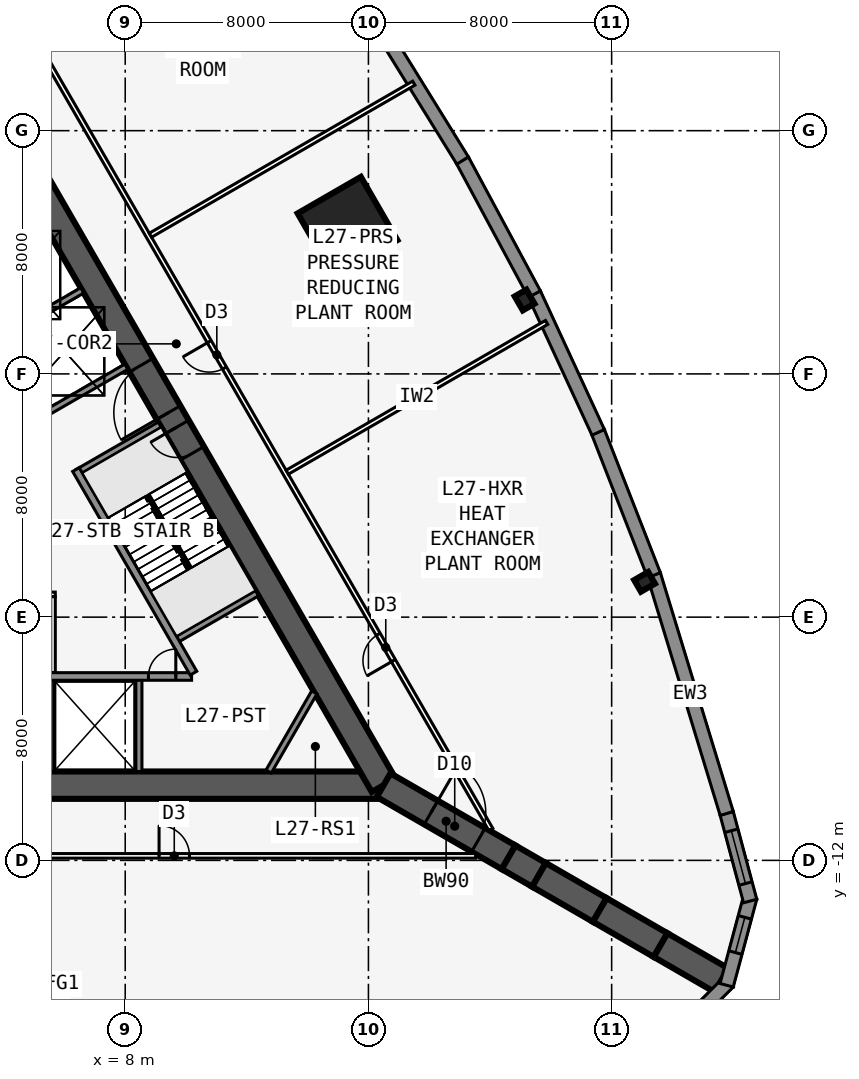
"""IFC4 building model, lengths in metres.
Left out: names, types, materials, properties, quantities, classifications, styles, units other than length and angle.
Written with IfcOpenShell. Run it as: python <this file> out.ifc"""

import sys

from ifc_helpers import new_model, si_unit, direction, frame, frame_2d, origin, origin_2d, place, context, subcontext, project, spatial, polyline, rectangle, i_section, outline, extrude, element, fill, save


model = new_model("IFC4")
c1 = context("Model", 3, precision=1e-05, world=origin(), true_north=direction((0.0, 1.0)))
c2 = subcontext(c1, "Body", "Model", "MODEL_VIEW")
j1 = project(units=[si_unit("LENGTHUNIT", "METRE"), si_unit("PLANEANGLEUNIT", "RADIAN")], contexts=[c1])
p1 = place(None, origin())
s1 = spatial("IfcSite", under=j1, at=p1, CompositionType="ELEMENT")
p2 = place(p1, origin())
s2 = spatial("IfcBuilding", under=s1, at=p2, CompositionType="ELEMENT")
p3 = place(p2, frame((0.0, 0.0, 103.3)))
s3 = spatial("IfcBuildingStorey", under=s2, at=p3, CompositionType="ELEMENT", Elevation=103.3)
p4 = place(p3, frame((-16.5, -9.526, 0.0), z_axis=(0.0, 0.0, 1.0), x_axis=(1.0, 0.0, 0.0)))
e1 = element("IfcWall", 1, at=p4, inside=s3, PredefinedType="SHEAR", context=c2, shape_type="SweptSolid", body=[
    extrude(rectangle(XDim=33.0, YDim=0.9, at=frame_2d((16.5, 0.0))), origin(), (0.0, 0.0, 1.0), 6.4),
])
p5 = place(p4, frame((14.05, 0.0, 0.0)))
e2 = element("IfcOpeningElement", 2, at=p5, cuts=e1, PredefinedType="OPENING", context=c2, shape_type="SweptSolid", body=[
    extrude(rectangle(XDim=1.8, YDim=2.13, at=frame_2d((0.9, 1.065))), frame((0.0, 0.46, 0.0), z_axis=(0.0, -1.0, 0.0), x_axis=(1.0, 0.0, 0.0)), (0.0, 0.0, 1.0), 0.92),
])
p6 = place(p3, frame((-0.55, -5.951, 0.0), z_axis=(0.0, 0.0, 1.0), x_axis=(1.0, 0.0, 0.0)))
e3 = element("IfcWall", 3, at=p6, inside=s3, PredefinedType="SOLIDWALL", context=c2, shape_type="SweptSolid", body=[
    extrude(rectangle(XDim=10.733, YDim=0.25, at=frame_2d((5.366, 0.0))), origin(), (0.0, 0.0, 1.0), 6.15),
])
p7 = place(p6, frame((9.314, 0.0, 0.0)))
e4 = element("IfcOpeningElement", 4, at=p7, cuts=e3, PredefinedType="OPENING", context=c2, shape_type="SweptSolid", body=[
    extrude(rectangle(XDim=0.9, YDim=2.13, at=frame_2d((0.45, 1.065))), frame((0.0, 0.135, 0.0), z_axis=(0.0, -1.0, 0.0), x_axis=(1.0, 0.0, 0.0)), (0.0, 0.0, 1.0), 0.27),
])
p8 = place(p6, frame((1.05, 0.0, 0.0)))
e5 = element("IfcOpeningElement", 5, at=p8, cuts=e3, PredefinedType="OPENING", context=c2, shape_type="SweptSolid", body=[
    extrude(rectangle(XDim=1.1, YDim=2.13, at=frame_2d((0.55, 1.065))), frame((0.0, 0.135, 0.0), z_axis=(0.0, -1.0, 0.0), x_axis=(1.0, 0.0, 0.0)), (0.0, 0.0, 1.0), 0.27),
])
p9 = place(p6, frame((4.05, 0.0, 0.0)))
e6 = element("IfcOpeningElement", 6, at=p9, cuts=e3, PredefinedType="OPENING", context=c2, shape_type="SweptSolid", body=[
    extrude(rectangle(XDim=1.1, YDim=2.13, at=frame_2d((0.55, 1.065))), frame((0.0, 0.135, 0.0), z_axis=(0.0, -1.0, 0.0), x_axis=(1.0, 0.0, 0.0)), (0.0, 0.0, 1.0), 0.27),
])
for number, where, z_axis, x_axis in (
    (7, (5.55, -5.951, 0.0), (0.0, 0.0, 1.0), (0.0, -1.0, 0.0)),
    (8, (8.45, -5.951, 0.0), (0.0, 0.0, 1.0), (0.0, -1.0, 0.0)),
):
    element("IfcWall", number, at=place(p3, frame(where, z_axis=z_axis, x_axis=x_axis)), inside=s3, PredefinedType="SOLIDWALL", context=c2, shape_type="SweptSolid", body=[
        extrude(rectangle(XDim=3.125, YDim=0.2, at=frame_2d((1.562, 0.0))), origin(), (0.0, 0.0, 1.0), 6.15),
    ])
p10 = place(p3, frame((16.5, -9.526, 0.0), z_axis=(0.0, 0.0, 1.0), x_axis=(-0.499999749417, 0.866025548458, 0.0)))
e9 = element("IfcWall", 9, at=p10, inside=s3, PredefinedType="SHEAR", context=c2, shape_type="SweptSolid", body=[
    extrude(rectangle(XDim=33.0, YDim=0.9, at=frame_2d((16.5, 0.0))), origin(), (0.0, 0.0, 1.0), 6.4),
])
p11 = place(p10, frame((14.15, 0.0, 0.0)))
e10 = element("IfcOpeningElement", 10, at=p11, cuts=e9, PredefinedType="OPENING", context=c2, shape_type="SweptSolid", body=[
    extrude(rectangle(XDim=1.8, YDim=2.13, at=frame_2d((0.9, 1.065))), frame((0.0, 0.46, 0.0), z_axis=(0.0, -1.0, 0.0), x_axis=(1.0, 0.0, 0.0)), (0.0, 0.0, 1.0), 0.92),
])
p12 = place(p10, frame((12.6, 0.0, 0.0)))
e11 = element("IfcOpeningElement", 11, at=p12, cuts=e9, PredefinedType="OPENING", context=c2, shape_type="SweptSolid", body=[
    extrude(rectangle(XDim=1.0, YDim=2.13, at=frame_2d((0.5, 1.065))), frame((0.0, 0.46, 0.0), z_axis=(0.0, -1.0, 0.0), x_axis=(1.0, 0.0, 0.0)), (0.0, 0.0, 1.0), 0.92),
])
p13 = place(p3, frame((10.245, -5.843, 0.0), z_axis=(0.0, 0.0, 1.0), x_axis=(-0.499993009313, 0.866029439822, 0.0)))
e12 = element("IfcWall", 12, at=p13, inside=s3, PredefinedType="SOLIDWALL", context=c2, shape_type="SweptSolid", body=[
    extrude(rectangle(XDim=7.733, YDim=0.25, at=frame_2d((3.866, 0.0))), origin(), (0.0, 0.0, 1.0), 6.15),
])
for number, where, z_axis, x_axis in (
    (13, (9.629, -4.775, 0.0), (0.0, 0.0, 1.0), (0.866, 0.5, 0.0)),
    (14, (6.429, 0.767, 0.0), (0.0, 0.0, 1.0), (0.866, 0.5, 0.0)),
    (15, (5.329, 2.673, 0.0), (0.0, 0.0, 1.0), (0.866, 0.5, 0.0)),
    (16, (3.879, 5.184, 0.0), (0.0, 0.0, 1.0), (0.866, 0.5, 0.0)),
):
    element("IfcWall", number, at=place(p3, frame(where, z_axis=z_axis, x_axis=x_axis)), inside=s3, PredefinedType="SOLIDWALL", context=c2, shape_type="SweptSolid", body=[
        extrude(rectangle(XDim=3.125, YDim=0.2, at=frame_2d((1.562, 0.0))), origin(), (0.0, 0.0, 1.0), 6.15),
    ])
p14 = place(p3, frame((16.5, -9.526, 0.0), z_axis=(0.0, 0.0, 1.0), x_axis=(0.866031398331, -0.499989616998, 0.0)))
e17 = element("IfcWall", 17, at=p14, inside=s3, PredefinedType="SHEAR", context=c2, shape_type="SweptSolid", body=[
    extrude(rectangle(XDim=4.746, YDim=0.9, at=frame_2d((2.373, 0.0))), origin(), (0.0, 0.0, 1.0), 6.4),
])
p15 = place(p14, frame((1.8, 0.0, 0.0)))
e18 = element("IfcOpeningElement", 18, at=p15, cuts=e17, PredefinedType="OPENING", context=c2, shape_type="SweptSolid", body=[
    extrude(rectangle(XDim=1.8, YDim=2.13, at=frame_2d((0.9, 1.065))), frame((0.0, 0.46, 0.0), z_axis=(0.0, -1.0, 0.0), x_axis=(1.0, 0.0, 0.0)), (0.0, 0.0, 1.0), 0.92),
])
p16 = place(p3, frame((20.61, -11.899, 0.0), z_axis=(0.0, 0.0, 1.0), x_axis=(0.866009537788, -0.500027479704, 0.0)))
e19 = element("IfcWall", 19, at=p16, inside=s3, PredefinedType="SHEAR", context=c2, shape_type="SweptSolid", body=[
    extrude(rectangle(XDim=1.155, YDim=0.9, at=frame_2d((0.577, 0.0))), origin(), (0.0, 0.0, 1.0), 6.4),
])
for number, where, z_axis, x_axis in (
    (20, (21.61, -12.477, 0.0), (0.0, 0.0, 1.0), (0.866, -0.5, 0.0)),
    (21, (23.61, -13.631, 0.0), (0.0, 0.0, 1.0), (0.866, -0.5, 0.0)),
    (22, (25.61, -14.786, 0.0), (0.0, 0.0, 1.0), (0.866, -0.5, 0.0)),
):
    element("IfcWall", number, at=place(p3, frame(where, z_axis=z_axis, x_axis=x_axis)), inside=s3, PredefinedType="SHEAR", context=c2, shape_type="SweptSolid", body=[
        extrude(rectangle(XDim=2.309, YDim=0.9, at=frame_2d((1.155, 0.0))), origin(), (0.0, 0.0, 1.0), 6.4),
    ])
for number, where, z_axis, x_axis in (
    (23, (25.083, -2.839, 0.0), (0.0, 0.0, 1.0), (-0.5, 0.866, 0.0)),
    (24, (21.137, 6.43, 0.0), (0.0, 0.0, 1.0), (0.866, 0.5, 0.0)),
):
    element("IfcColumn", number, at=place(p3, frame(where, z_axis=z_axis, x_axis=x_axis)), inside=s3, PredefinedType="COLUMN", context=c2, shape_type="SweptSolid", body=[
        extrude(i_section(OverallWidth=0.442, OverallDepth=0.531, WebThickness=0.066, FlangeThickness=0.106, at=origin_2d()), origin(), (0.0, 0.0, 1.0), 6.4),
    ])
p17 = place(p3, frame((15.312, 8.84, 0.0), z_axis=(0.0, 0.0, 1.0), x_axis=(0.866025403784, 0.5, 0.0)))
e25 = element("IfcColumn", 25, at=p17, inside=s3, PredefinedType="COLUMN", context=c2, shape_type="SweptSolid", body=[
    extrude(rectangle(XDim=2.4, YDim=2.4, at=origin_2d()), origin(), (0.0, 0.0, 1.0), 6.4),
])
p18 = place(p3, frame((25.728, -18.12, 0.0), z_axis=(0.0, 0.0, 1.0), x_axis=(0.707025086683, 0.707188466253, 0.0)))
e26 = element("IfcWall", 26, at=p18, inside=s3, PredefinedType="SOLIDWALL", context=c2, shape_type="SweptSolid", body=[
    extrude(outline(polyline([(2.989, 0.225), (2.93, 0.225), (2.438, 0.093), (2.402, 0.225), (0.0, 0.225), (0.0, -0.225), (2.989, -0.225), (2.989, 0.225)])), origin(), (0.0, 0.0, 1.0), 6.15),
])
p19 = place(p18, frame((0.676, 0.0, 1.2)))
e27 = element("IfcOpeningElement", 27, at=p19, cuts=e26, PredefinedType="OPENING", context=c2, shape_type="SweptSolid", body=[
    extrude(rectangle(XDim=1.2, YDim=3.6, at=frame_2d((0.6, 1.8))), frame((0.0, 0.235, 0.0), z_axis=(0.0, -1.0, 0.0), x_axis=(1.0, 0.0, 0.0)), (0.0, 0.0, 1.0), 0.47),
])
p20 = place(p3, frame((27.783, -16.108, 0.0), z_axis=(0.0, 0.0, 1.0), x_axis=(0.258801419081, 0.965930548995, 0.0)))
e28 = element("IfcWall", 28, at=p20, inside=s3, PredefinedType="SOLIDWALL", context=c2, shape_type="SweptSolid", body=[
    extrude(outline(polyline([(2.989, 0.225), (0.586, 0.225), (0.551, 0.093), (0.06, 0.225), (0.0, 0.225), (0.0, -0.225), (2.989, -0.225), (2.989, 0.225)])), origin(), (0.0, 0.0, 1.0), 6.15),
])
p21 = place(p20, frame((1.113, 0.0, 1.2)))
e29 = element("IfcOpeningElement", 29, at=p21, cuts=e28, PredefinedType="OPENING", context=c2, shape_type="SweptSolid", body=[
    extrude(rectangle(XDim=1.2, YDim=3.6, at=frame_2d((0.6, 1.8))), frame((0.0, 0.235, 0.0), z_axis=(0.0, -1.0, 0.0), x_axis=(1.0, 0.0, 0.0)), (0.0, 0.0, 1.0), 0.47),
])
p22 = place(p3, frame((28.556, -13.337, 0.0), z_axis=(0.0, 0.0, 1.0), x_axis=(-0.258780998834, 0.965936019953, 0.0)))
e30 = element("IfcWall", 30, at=p22, inside=s3, PredefinedType="SOLIDWALL", context=c2, shape_type="SweptSolid", body=[
    extrude(rectangle(XDim=2.989, YDim=0.45, at=frame_2d((1.494, 0.0))), origin(), (0.0, 0.0, 1.0), 6.15),
])
p23 = place(p22, frame((0.594, 0.0, 1.2)))
e31 = element("IfcOpeningElement", 31, at=p23, cuts=e30, PredefinedType="OPENING", context=c2, shape_type="SweptSolid", body=[
    extrude(rectangle(XDim=1.8, YDim=3.6, at=frame_2d((0.9, 1.8))), frame((0.0, 0.235, 0.0), z_axis=(0.0, -1.0, 0.0), x_axis=(1.0, 0.0, 0.0)), (0.0, 0.0, 1.0), 0.47),
])
p24 = place(p3, frame((27.785, -10.458, 0.0), z_axis=(0.0, 0.0, 1.0), x_axis=(-0.291997961298, 0.956418940945, 0.0)))
e32 = element("IfcWall", 32, at=p24, inside=s3, PredefinedType="SOLIDWALL", context=c2, shape_type="SweptSolid", body=[
    extrude(outline(polyline([(0.0, 0.0), (8.211, 0.0), (8.211, 6.15), (0.0, 6.15), (0.0, 0.0)]), holes=[polyline([(6.556, 3.075), (6.472, 3.709), (6.227, 4.3), (5.838, 4.807), (5.331, 5.197), (4.74, 5.441), (4.106, 5.525), (3.471, 5.441), (2.881, 5.197), (2.373, 4.807), (1.984, 4.3), (1.739, 3.709), (1.656, 3.075), (1.739, 2.441), (1.984, 1.85), (2.373, 1.343), (2.881, 0.953), (3.471, 0.708), (4.106, 0.625), (4.74, 0.708), (5.331, 0.953), (5.838, 1.343), (6.227, 1.85), (6.472, 2.441), (6.556, 3.075)])]), frame((0.0, 0.225, 0.0), z_axis=(0.0, -1.0, 0.0), x_axis=(1.0, 0.0, 0.0)), (0.0, 0.0, 1.0), 0.45),
])
p25 = place(p3, frame((25.393, -2.621, 0.0), z_axis=(0.0, 0.0, 1.0), x_axis=(-0.363971587738, 0.931410051116, 0.0)))
e33 = element("IfcWall", 33, at=p25, inside=s3, PredefinedType="SOLIDWALL", context=c2, shape_type="SweptSolid", body=[
    extrude(outline(polyline([(0.0, 0.0), (5.058, 0.0), (5.058, 6.15), (0.0, 6.15), (0.0, 0.0)]), holes=[polyline([(4.429, 3.075), (4.364, 3.567), (4.174, 4.025), (3.872, 4.418), (3.479, 4.72), (3.021, 4.91), (2.529, 4.975), (2.037, 4.91), (1.579, 4.72), (1.185, 4.418), (0.883, 4.025), (0.694, 3.567), (0.629, 3.075), (0.694, 2.583), (0.883, 2.125), (1.185, 1.731), (1.579, 1.429), (2.037, 1.24), (2.529, 1.175), (3.021, 1.24), (3.479, 1.429), (3.872, 1.731), (4.174, 2.125), (4.364, 2.583), (4.429, 3.075)])]), frame((0.0, 0.225, 0.0), z_axis=(0.0, -1.0, 0.0), x_axis=(1.0, 0.0, 0.0)), (0.0, 0.0, 1.0), 0.45),
])
p26 = place(p3, frame((23.557, 2.077, 0.0), z_axis=(0.0, 0.0, 1.0), x_axis=(-0.419203100754, 0.907892482796, 0.0)))
e34 = element("IfcWall", 34, at=p26, inside=s3, PredefinedType="SOLIDWALL", context=c2, shape_type="SweptSolid", body=[
    extrude(outline(polyline([(0.0, 0.0), (5.021, 0.0), (5.021, 6.15), (0.0, 6.15), (0.0, 0.0)]), holes=[polyline([(4.41, 3.075), (4.346, 3.567), (4.156, 4.025), (3.854, 4.418), (3.46, 4.72), (3.002, 4.91), (2.51, 4.975), (2.019, 4.91), (1.56, 4.72), (1.167, 4.418), (0.865, 4.025), (0.675, 3.567), (0.61, 3.075), (0.675, 2.583), (0.865, 2.125), (1.167, 1.731), (1.56, 1.429), (2.019, 1.24), (2.51, 1.175), (3.002, 1.24), (3.46, 1.429), (3.854, 1.731), (4.156, 2.125), (4.346, 2.583), (4.41, 3.075)])]), frame((0.0, 0.225, 0.0), z_axis=(0.0, -1.0, 0.0), x_axis=(1.0, 0.0, 0.0)), (0.0, 0.0, 1.0), 0.45),
])
p27 = place(p3, frame((21.458, 6.624, 0.0), z_axis=(0.0, 0.0, 1.0), x_axis=(-0.473412820489, 0.880840678782, 0.0)))
e35 = element("IfcWall", 35, at=p27, inside=s3, PredefinedType="SOLIDWALL", context=c2, shape_type="SweptSolid", body=[
    extrude(outline(polyline([(0.0, 0.0), (5.002, 0.0), (5.002, 6.15), (0.0, 6.15), (0.0, 0.0)]), holes=[polyline([(4.401, 3.075), (4.336, 3.567), (4.146, 4.025), (3.845, 4.418), (3.451, 4.72), (2.993, 4.91), (2.501, 4.975), (2.01, 4.91), (1.551, 4.72), (1.158, 4.418), (0.856, 4.025), (0.666, 3.567), (0.601, 3.075), (0.666, 2.583), (0.856, 2.125), (1.158, 1.731), (1.551, 1.429), (2.01, 1.24), (2.501, 1.175), (2.993, 1.24), (3.451, 1.429), (3.845, 1.731), (4.146, 2.125), (4.336, 2.583), (4.401, 3.075)])]), frame((0.0, 0.225, 0.0), z_axis=(0.0, -1.0, 0.0), x_axis=(1.0, 0.0, 0.0)), (0.0, 0.0, 1.0), 0.45),
])
p28 = place(p3, frame((19.097, 11.018, 0.0), z_axis=(0.0, 0.0, 1.0), x_axis=(-0.52611097126, 0.850415925251, 0.0)))
e36 = element("IfcWall", 36, at=p28, inside=s3, PredefinedType="SOLIDWALL", context=c2, shape_type="SweptSolid", body=[
    extrude(outline(polyline([(0.0, 0.0), (5.002, 0.0), (5.002, 6.15), (0.0, 6.15), (0.0, 0.0)]), holes=[polyline([(4.401, 3.075), (4.336, 3.567), (4.146, 4.025), (3.844, 4.418), (3.451, 4.72), (2.993, 4.91), (2.501, 4.975), (2.01, 4.91), (1.551, 4.72), (1.158, 4.418), (0.856, 4.025), (0.666, 3.567), (0.601, 3.075), (0.666, 2.583), (0.856, 2.125), (1.158, 1.731), (1.551, 1.429), (2.01, 1.24), (2.501, 1.175), (2.993, 1.24), (3.451, 1.429), (3.844, 1.731), (4.146, 2.125), (4.336, 2.583), (4.401, 3.075)])]), frame((0.0, 0.225, 0.0), z_axis=(0.0, -1.0, 0.0), x_axis=(1.0, 0.0, 0.0)), (0.0, 0.0, 1.0), 0.45),
])
p29 = place(p3, frame((-19.527, -11.851, 0.0), z_axis=(0.0, 0.0, 1.0), x_axis=(1.0, 0.0, 0.0)))
e37 = element("IfcWall", 37, at=p29, inside=s3, PredefinedType="PARTITIONING", context=c2, shape_type="SweptSolid", body=[
    extrude(rectangle(XDim=39.054, YDim=0.15, at=frame_2d((19.527, 0.0))), origin(), (0.0, 0.0, 1.0), 6.15),
])
p30 = place(p29, frame((7.414, 0.0, 0.0)))
e38 = element("IfcOpeningElement", 38, at=p30, cuts=e37, PredefinedType="OPENING", context=c2, shape_type="SweptSolid", body=[
    extrude(rectangle(XDim=1.0, YDim=2.13, at=frame_2d((0.5, 1.065))), frame((0.0, 0.085, 0.0), z_axis=(0.0, -1.0, 0.0), x_axis=(1.0, 0.0, 0.0)), (0.0, 0.0, 1.0), 0.17),
])
p31 = place(p29, frame((17.027, 0.0, 0.0)))
e39 = element("IfcOpeningElement", 39, at=p31, cuts=e37, PredefinedType="OPENING", context=c2, shape_type="SweptSolid", body=[
    extrude(rectangle(XDim=1.0, YDim=2.13, at=frame_2d((0.5, 1.065))), frame((0.0, 0.085, 0.0), z_axis=(0.0, -1.0, 0.0), x_axis=(1.0, 0.0, 0.0)), (0.0, 0.0, 1.0), 0.17),
])
p32 = place(p29, frame((28.64, 0.0, 0.0)))
e40 = element("IfcOpeningElement", 40, at=p32, cuts=e37, PredefinedType="OPENING", context=c2, shape_type="SweptSolid", body=[
    extrude(rectangle(XDim=1.0, YDim=2.13, at=frame_2d((0.5, 1.065))), frame((0.0, 0.085, 0.0), z_axis=(0.0, -1.0, 0.0), x_axis=(1.0, 0.0, 0.0)), (0.0, 0.0, 1.0), 0.17),
])
p33 = place(p3, frame((20.027, -10.985, 0.0), z_axis=(0.0, 0.0, 1.0), x_axis=(-0.500001677587, 0.866024435227, 0.0)))
e41 = element("IfcWall", 41, at=p33, inside=s3, PredefinedType="PARTITIONING", context=c2, shape_type="SweptSolid", body=[
    extrude(rectangle(XDim=39.054, YDim=0.15, at=frame_2d((19.527, 0.0))), origin(), (0.0, 0.0, 1.0), 6.15),
])
p34 = place(p33, frame((6.414, 0.0, 0.0)))
e42 = element("IfcOpeningElement", 42, at=p34, cuts=e41, PredefinedType="OPENING", context=c2, shape_type="SweptSolid", body=[
    extrude(rectangle(XDim=1.0, YDim=2.13, at=frame_2d((0.5, 1.065))), frame((0.0, 0.085, 0.0), z_axis=(0.0, -1.0, 0.0), x_axis=(1.0, 0.0, 0.0)), (0.0, 0.0, 1.0), 0.17),
])
p35 = place(p33, frame((17.527, 0.0, 0.0)))
e43 = element("IfcOpeningElement", 43, at=p35, cuts=e41, PredefinedType="OPENING", context=c2, shape_type="SweptSolid", body=[
    extrude(rectangle(XDim=1.0, YDim=2.13, at=frame_2d((0.5, 1.065))), frame((0.0, 0.085, 0.0), z_axis=(0.0, -1.0, 0.0), x_axis=(1.0, 0.0, 0.0)), (0.0, 0.0, 1.0), 0.17),
])
p36 = place(p33, frame((30.14, 0.0, 0.0)))
e44 = element("IfcOpeningElement", 44, at=p36, cuts=e41, PredefinedType="OPENING", context=c2, shape_type="SweptSolid", body=[
    extrude(rectangle(XDim=1.0, YDim=2.13, at=frame_2d((0.5, 1.065))), frame((0.0, 0.085, 0.0), z_axis=(0.0, -1.0, 0.0), x_axis=(1.0, 0.0, 0.0)), (0.0, 0.0, 1.0), 0.17),
])
p37 = place(p3, frame((13.329, 0.767, 0.0), z_axis=(0.0, 0.0, 1.0), x_axis=(0.866026289155, 0.499998466491, 0.0)))
e45 = element("IfcWall", 45, at=p37, inside=s3, PredefinedType="PARTITIONING", context=c2, shape_type="SweptSolid", body=[
    extrude(rectangle(XDim=9.852, YDim=0.15, at=frame_2d((4.926, 0.0))), origin(), (0.0, 0.0, 1.0), 6.15),
])
p38 = place(p3, frame((8.829, 8.561, 0.0), z_axis=(0.0, 0.0, 1.0), x_axis=(0.86602100491, 0.500007618997, 0.0)))
e46 = element("IfcWall", 46, at=p38, inside=s3, PredefinedType="PARTITIONING", context=c2, shape_type="SweptSolid", body=[
    extrude(rectangle(XDim=10.005, YDim=0.15, at=frame_2d((5.002, 0.0))), origin(), (0.0, 0.0, 1.0), 6.15),
])
p39 = place(p3, frame((-2.65, -3.251, 0.0), z_axis=(0.0, 0.0, 1.0), x_axis=(1.0, 0.0, 0.0)))
e47 = element("IfcWall", 47, at=p39, inside=s3, PredefinedType="PARTITIONING", context=c2, shape_type="SweptSolid", body=[
    extrude(rectangle(XDim=8.35, YDim=0.15, at=frame_2d((4.175, 0.0))), origin(), (0.0, 0.0, 1.0), 6.15),
])
p40 = place(p3, frame((5.625, -5.826, 0.0), z_axis=(0.0, 0.0, 1.0), x_axis=(0.0, 1.0, 0.0)))
e48 = element("IfcWall", 48, at=p40, inside=s3, PredefinedType="PARTITIONING", context=c2, shape_type="SweptSolid", body=[
    extrude(rectangle(XDim=2.5, YDim=0.15, at=frame_2d((1.25, 0.0))), origin(), (0.0, 0.0, 1.0), 6.15),
])
p41 = place(p3, frame((14.219, -6.476, 0.0), z_axis=(0.0, 0.0, 1.0), x_axis=(-0.499952404951, -0.866052881055, 0.0)))
e49 = element("IfcWall", 49, at=p41, inside=s3, PredefinedType="SOLIDWALL", context=c2, shape_type="SweptSolid", body=[
    extrude(rectangle(XDim=3.002, YDim=0.2, at=frame_2d((1.501, 0.0))), origin(), (0.0, 0.0, 1.0), 6.15),
])
p42 = place(p3, frame((10.135, -2.401, 0.0), z_axis=(0.0, 0.0, 1.0), x_axis=(-0.499992232847, 0.866029888106, 0.0)))
e50 = element("IfcWall", 50, at=p42, inside=s3, PredefinedType="SOLIDWALL", context=c2, shape_type="SweptSolid", body=[
    extrude(rectangle(XDim=2.794, YDim=0.1, at=frame_2d((1.397, 0.0))), origin(), (0.0, 0.0, 1.0), 6.4),
])
p43 = place(p21, origin())
e51 = element("IfcWindow", 51, at=p43, inside=s3, PartitioningType="SINGLE_PANEL", PredefinedType="WINDOW", context=c2, shape_type="SweptSolid", body=[
    extrude(rectangle(XDim=1.2, YDim=3.6, at=frame_2d((0.6, 1.8))), frame((0.0, 0.03, 0.0), z_axis=(0.0, -1.0, 0.0), x_axis=(1.0, 0.0, 0.0)), (0.0, 0.0, 1.0), 0.06),
])
fill(e29, e51)
p44 = place(p23, origin())
e52 = element("IfcWindow", 52, at=p44, inside=s3, PartitioningType="SINGLE_PANEL", PredefinedType="WINDOW", context=c2, shape_type="SweptSolid", body=[
    extrude(rectangle(XDim=1.8, YDim=3.6, at=frame_2d((0.9, 1.8))), frame((0.0, 0.03, 0.0), z_axis=(0.0, -1.0, 0.0), x_axis=(1.0, 0.0, 0.0)), (0.0, 0.0, 1.0), 0.06),
])
fill(e31, e52)
p45 = place(p32, origin())
e53 = element("IfcDoor", 53, at=p45, inside=s3, OperationType="SINGLE_SWING_LEFT", PredefinedType="DOOR", context=c2, shape_type="SweptSolid", body=[
    extrude(rectangle(XDim=1.0, YDim=2.13, at=frame_2d((0.5, 1.065))), frame((0.0, 0.025, 0.0), z_axis=(0.0, -1.0, 0.0), x_axis=(1.0, 0.0, 0.0)), (0.0, 0.0, 1.0), 0.05),
])
fill(e40, e53)
p46 = place(p34, origin())
e54 = element("IfcDoor", 54, at=p46, inside=s3, OperationType="SINGLE_SWING_LEFT", PredefinedType="DOOR", context=c2, shape_type="SweptSolid", body=[
    extrude(rectangle(XDim=1.0, YDim=2.13, at=frame_2d((0.5, 1.065))), frame((0.0, 0.025, 0.0), z_axis=(0.0, -1.0, 0.0), x_axis=(1.0, 0.0, 0.0)), (0.0, 0.0, 1.0), 0.05),
])
fill(e42, e54)
p47 = place(p35, origin())
e55 = element("IfcDoor", 55, at=p47, inside=s3, OperationType="SINGLE_SWING_RIGHT", PredefinedType="DOOR", context=c2, shape_type="SweptSolid", body=[
    extrude(rectangle(XDim=1.0, YDim=2.13, at=frame_2d((0.5, 1.065))), frame((0.0, 0.025, 0.0), z_axis=(0.0, -1.0, 0.0), x_axis=(1.0, 0.0, 0.0)), (0.0, 0.0, 1.0), 0.05),
])
fill(e43, e55)
p48 = place(p11, origin())
e56 = element("IfcDoor", 56, at=p48, inside=s3, OperationType="DOUBLE_DOOR_SINGLE_SWING", PredefinedType="DOOR", context=c2, shape_type="SweptSolid", body=[
    extrude(rectangle(XDim=1.8, YDim=2.13, at=frame_2d((0.9, 1.065))), frame((0.0, 0.025, 0.0), z_axis=(0.0, -1.0, 0.0), x_axis=(1.0, 0.0, 0.0)), (0.0, 0.0, 1.0), 0.05),
])
fill(e10, e56)
p49 = place(p12, origin())
e57 = element("IfcDoor", 57, at=p49, inside=s3, OperationType="SINGLE_SWING_RIGHT", PredefinedType="DOOR", context=c2, shape_type="SweptSolid", body=[
    extrude(rectangle(XDim=1.0, YDim=2.13, at=frame_2d((0.5, 1.065))), frame((0.0, 0.025, 0.0), z_axis=(0.0, -1.0, 0.0), x_axis=(1.0, 0.0, 0.0)), (0.0, 0.0, 1.0), 0.05),
])
fill(e11, e57)
p50 = place(p15, origin())
e58 = element("IfcDoor", 58, at=p50, inside=s3, OperationType="DOUBLE_DOOR_DOUBLE_SWING", PredefinedType="DOOR", context=c2, shape_type="SweptSolid", body=[
    extrude(rectangle(XDim=1.8, YDim=2.13, at=frame_2d((0.9, 1.065))), frame((0.0, 0.025, 0.0), z_axis=(0.0, -1.0, 0.0), x_axis=(1.0, 0.0, 0.0)), (0.0, 0.0, 1.0), 0.05),
])
fill(e18, e58)
p51 = place(p7, origin())
e59 = element("IfcDoor", 59, at=p51, inside=s3, OperationType="SINGLE_SWING_RIGHT", PredefinedType="DOOR", context=c2, shape_type="SweptSolid", body=[
    extrude(rectangle(XDim=0.9, YDim=2.13, at=frame_2d((0.45, 1.065))), frame((0.0, 0.025, 0.0), z_axis=(0.0, -1.0, 0.0), x_axis=(1.0, 0.0, 0.0)), (0.0, 0.0, 1.0), 0.05),
])
fill(e4, e59)
save(model, sys.argv[1])
